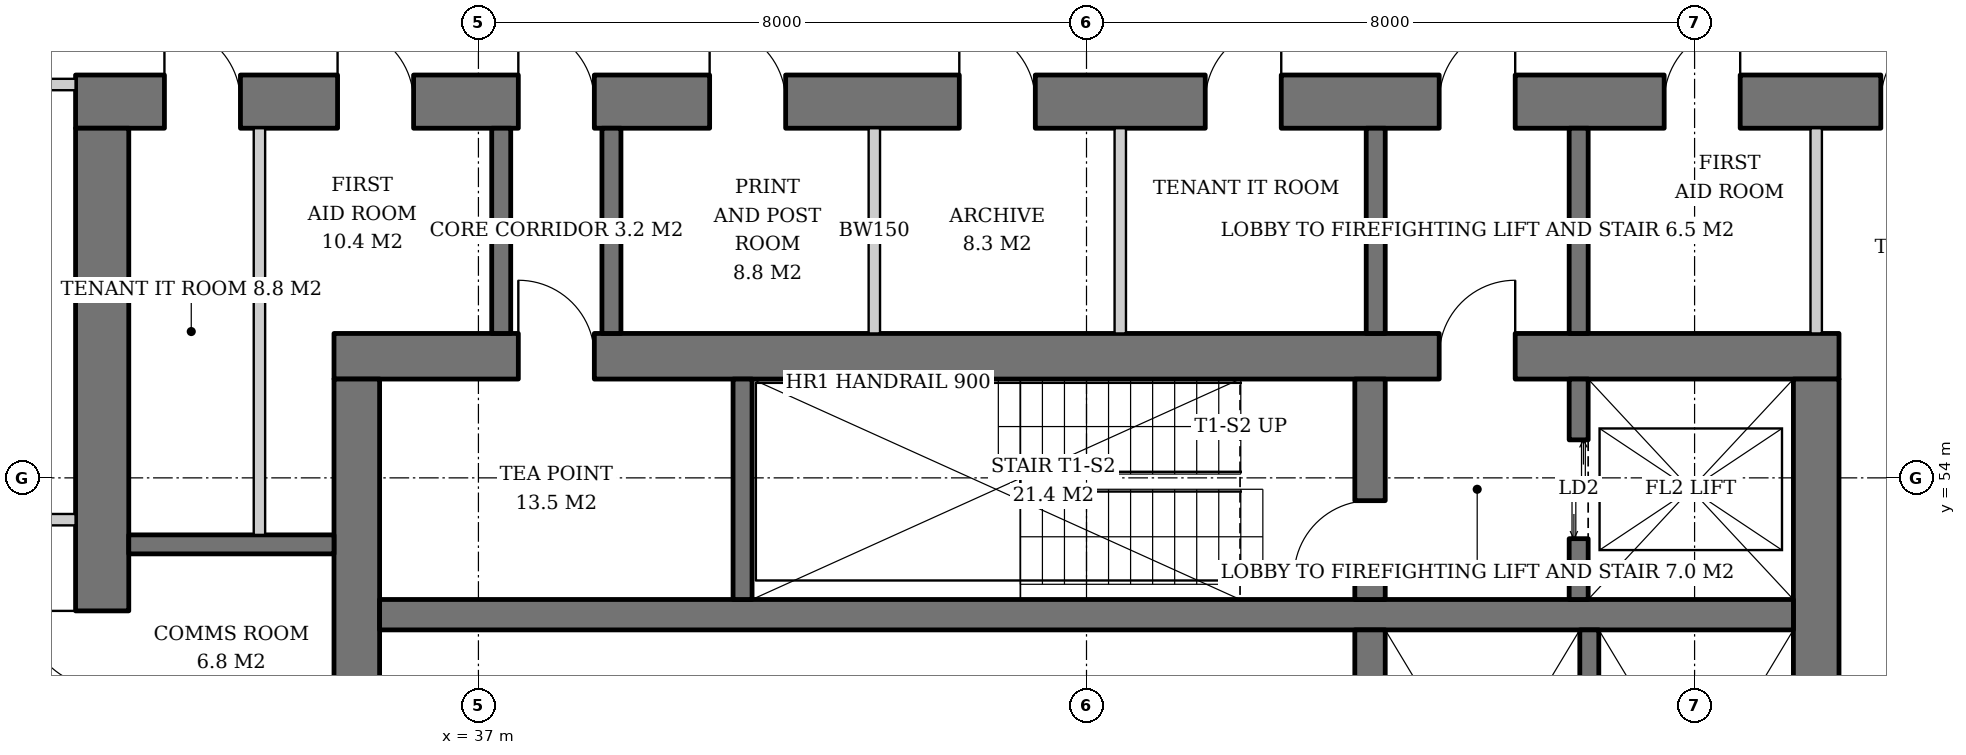
"""IFC4 building model, lengths in metres.
Left out: names, types, materials, properties, quantities, classifications, styles, units other than length and angle.
Written with IfcOpenShell. Run it as: python <this file> out.ifc"""

import sys

from ifc_helpers import new_model, si_unit, direction, frame, frame_2d, origin, place, context, subcontext, project, spatial, rectangle, extrude, element, fill, save


model = new_model("IFC4")
c1 = context("Model", 3, precision=1e-05, world=origin(), true_north=direction((0.0, 1.0)))
c2 = subcontext(c1, "Body", "Model", "MODEL_VIEW")
j1 = project(units=[si_unit("LENGTHUNIT", "METRE"), si_unit("PLANEANGLEUNIT", "RADIAN")], contexts=[c1])
p1 = place(None, origin())
s1 = spatial("IfcSite", under=j1, at=p1, CompositionType="ELEMENT")
p2 = place(p1, origin())
s2 = spatial("IfcBuilding", under=s1, at=p2, CompositionType="ELEMENT")
p3 = place(p2, frame((0.0, 0.0, 131.2)))
s3 = spatial("IfcBuildingStorey", under=s2, at=p3, CompositionType="ELEMENT", Elevation=131.2)
p4 = place(p3, frame((35.1, 55.6, 0.0), z_axis=(0.0, 0.0, 1.0), x_axis=(1.0, 0.0, 0.0)))
e1 = element("IfcWall", 1, at=p4, inside=s3, PredefinedType="SHEAR", context=c2, shape_type="SweptSolid", body=[
    extrude(rectangle(XDim=19.8, YDim=0.6, at=frame_2d((9.9, 0.0))), origin(), (0.0, 0.0, 1.0), 3.8),
])
p5 = place(p4, frame((14.54, 0.0, 0.0)))
e2 = element("IfcOpeningElement", 2, at=p5, cuts=e1, PredefinedType="OPENING", context=c2, shape_type="SweptSolid", body=[
    extrude(rectangle(XDim=1.0, YDim=2.1, at=frame_2d((0.5, 1.05))), frame((0.0, 0.31, 0.0), z_axis=(0.0, -1.0, 0.0), x_axis=(1.0, 0.0, 0.0)), (0.0, 0.0, 1.0), 0.62),
])
p6 = place(p4, frame((2.425, 0.0, 0.0)))
e3 = element("IfcOpeningElement", 3, at=p6, cuts=e1, PredefinedType="OPENING", context=c2, shape_type="SweptSolid", body=[
    extrude(rectangle(XDim=1.0, YDim=2.1, at=frame_2d((0.5, 1.05))), frame((0.0, 0.31, 0.0), z_axis=(0.0, -1.0, 0.0), x_axis=(1.0, 0.0, 0.0)), (0.0, 0.0, 1.0), 0.62),
])
p7 = place(p3, frame((35.4, 36.7, 0.0), z_axis=(0.0, 0.0, 1.0), x_axis=(0.0, 1.0, 0.0)))
e4 = element("IfcWall", 4, at=p7, inside=s3, PredefinedType="SHEAR", context=c2, shape_type="SweptSolid", body=[
    extrude(rectangle(XDim=18.6, YDim=0.6, at=frame_2d((9.3, 0.0))), origin(), (0.0, 0.0, 1.0), 3.8),
])
p8 = place(p7, frame((8.4, 0.0, 0.0)))
e5 = element("IfcOpeningElement", 5, at=p8, cuts=e4, PredefinedType="OPENING", context=c2, shape_type="SweptSolid", body=[
    extrude(rectangle(XDim=1.8, YDim=2.4, at=frame_2d((0.9, 1.2))), frame((0.0, 0.31, 0.0), z_axis=(0.0, -1.0, 0.0), x_axis=(1.0, 0.0, 0.0)), (0.0, 0.0, 1.0), 0.62),
])
p9 = place(p3, frame((54.6, 36.7, 0.0), z_axis=(0.0, 0.0, 1.0), x_axis=(0.0, 1.0, 0.0)))
e6 = element("IfcWall", 6, at=p9, inside=s3, PredefinedType="SHEAR", context=c2, shape_type="SweptSolid", body=[
    extrude(rectangle(XDim=18.6, YDim=0.6, at=frame_2d((9.3, 0.0))), origin(), (0.0, 0.0, 1.0), 3.8),
])
p10 = place(p9, frame((8.4, 0.0, 0.0)))
e7 = element("IfcOpeningElement", 7, at=p10, cuts=e6, PredefinedType="OPENING", context=c2, shape_type="SweptSolid", body=[
    extrude(rectangle(XDim=1.8, YDim=2.4, at=frame_2d((0.9, 1.2))), frame((0.0, 0.31, 0.0), z_axis=(0.0, -1.0, 0.0), x_axis=(1.0, 0.0, 0.0)), (0.0, 0.0, 1.0), 0.62),
])
p11 = place(p3, frame((31.7, 58.95, 0.0), z_axis=(0.0, 0.0, 1.0), x_axis=(1.0, 0.0, 0.0)))
e8 = element("IfcWall", 8, at=p11, inside=s3, PredefinedType="SHEAR", context=c2, shape_type="SweptSolid", body=[
    extrude(rectangle(XDim=26.6, YDim=0.7, at=frame_2d((13.3, 0.0))), origin(), (0.0, 0.0, 1.0), 3.8),
])
p12 = place(p11, frame((17.94, 0.0, 0.0)))
e9 = element("IfcOpeningElement", 9, at=p12, cuts=e8, PredefinedType="OPENING", context=c2, shape_type="SweptSolid", body=[
    extrude(rectangle(XDim=1.0, YDim=2.1, at=frame_2d((0.5, 1.05))), frame((0.0, 0.36, 0.0), z_axis=(0.0, -1.0, 0.0), x_axis=(1.0, 0.0, 0.0)), (0.0, 0.0, 1.0), 0.72),
])
p13 = place(p11, frame((5.825, 0.0, 0.0)))
e10 = element("IfcOpeningElement", 10, at=p13, cuts=e8, PredefinedType="OPENING", context=c2, shape_type="SweptSolid", body=[
    extrude(rectangle(XDim=1.0, YDim=2.1, at=frame_2d((0.5, 1.05))), frame((0.0, 0.36, 0.0), z_axis=(0.0, -1.0, 0.0), x_axis=(1.0, 0.0, 0.0)), (0.0, 0.0, 1.0), 0.72),
])
p14 = place(p11, frame((1.169, 0.0, 0.0)))
e11 = element("IfcOpeningElement", 11, at=p14, cuts=e8, PredefinedType="OPENING", context=c2, shape_type="SweptSolid", body=[
    extrude(rectangle(XDim=1.0, YDim=2.1, at=frame_2d((0.5, 1.05))), frame((0.0, 0.36, 0.0), z_axis=(0.0, -1.0, 0.0), x_axis=(1.0, 0.0, 0.0)), (0.0, 0.0, 1.0), 0.72),
])
p15 = place(p11, frame((3.447, 0.0, 0.0)))
e12 = element("IfcOpeningElement", 12, at=p15, cuts=e8, PredefinedType="OPENING", context=c2, shape_type="SweptSolid", body=[
    extrude(rectangle(XDim=1.0, YDim=2.1, at=frame_2d((0.5, 1.05))), frame((0.0, 0.36, 0.0), z_axis=(0.0, -1.0, 0.0), x_axis=(1.0, 0.0, 0.0)), (0.0, 0.0, 1.0), 0.72),
])
p16 = place(p11, frame((8.342, 0.0, 0.0)))
e13 = element("IfcOpeningElement", 13, at=p16, cuts=e8, PredefinedType="OPENING", context=c2, shape_type="SweptSolid", body=[
    extrude(rectangle(XDim=1.0, YDim=2.1, at=frame_2d((0.5, 1.05))), frame((0.0, 0.36, 0.0), z_axis=(0.0, -1.0, 0.0), x_axis=(1.0, 0.0, 0.0)), (0.0, 0.0, 1.0), 0.72),
])
p17 = place(p11, frame((11.626, 0.0, 0.0)))
e14 = element("IfcOpeningElement", 14, at=p17, cuts=e8, PredefinedType="OPENING", context=c2, shape_type="SweptSolid", body=[
    extrude(rectangle(XDim=1.0, YDim=2.1, at=frame_2d((0.5, 1.05))), frame((0.0, 0.36, 0.0), z_axis=(0.0, -1.0, 0.0), x_axis=(1.0, 0.0, 0.0)), (0.0, 0.0, 1.0), 0.72),
])
p18 = place(p11, frame((14.862, 0.0, 0.0)))
e15 = element("IfcOpeningElement", 15, at=p18, cuts=e8, PredefinedType="OPENING", context=c2, shape_type="SweptSolid", body=[
    extrude(rectangle(XDim=1.0, YDim=2.1, at=frame_2d((0.5, 1.05))), frame((0.0, 0.36, 0.0), z_axis=(0.0, -1.0, 0.0), x_axis=(1.0, 0.0, 0.0)), (0.0, 0.0, 1.0), 0.72),
])
p19 = place(p11, frame((20.9, 0.0, 0.0)))
e16 = element("IfcOpeningElement", 16, at=p19, cuts=e8, PredefinedType="OPENING", context=c2, shape_type="SweptSolid", body=[
    extrude(rectangle(XDim=1.0, YDim=2.1, at=frame_2d((0.5, 1.05))), frame((0.0, 0.36, 0.0), z_axis=(0.0, -1.0, 0.0), x_axis=(1.0, 0.0, 0.0)), (0.0, 0.0, 1.0), 0.72),
])
p20 = place(p11, frame((23.75, 0.0, 0.0)))
e17 = element("IfcOpeningElement", 17, at=p20, cuts=e8, PredefinedType="OPENING", context=c2, shape_type="SweptSolid", body=[
    extrude(rectangle(XDim=1.0, YDim=2.1, at=frame_2d((0.5, 1.05))), frame((0.0, 0.36, 0.0), z_axis=(0.0, -1.0, 0.0), x_axis=(1.0, 0.0, 0.0)), (0.0, 0.0, 1.0), 0.72),
])
p21 = place(p3, frame((32.05, 33.4, 0.0), z_axis=(0.0, 0.0, 1.0), x_axis=(0.0, 1.0, 0.0)))
e18 = element("IfcWall", 18, at=p21, inside=s3, PredefinedType="SHEAR", context=c2, shape_type="SweptSolid", body=[
    extrude(rectangle(XDim=25.2, YDim=0.7, at=frame_2d((12.6, 0.0))), origin(), (0.0, 0.0, 1.0), 3.8),
])
p22 = place(p21, frame((11.7, 0.0, 0.0)))
e19 = element("IfcOpeningElement", 19, at=p22, cuts=e18, PredefinedType="OPENING", context=c2, shape_type="SweptSolid", body=[
    extrude(rectangle(XDim=1.8, YDim=2.4, at=frame_2d((0.9, 1.2))), frame((0.0, 0.36, 0.0), z_axis=(0.0, -1.0, 0.0), x_axis=(1.0, 0.0, 0.0)), (0.0, 0.0, 1.0), 0.72),
])
p23 = place(p21, frame((3.6, 0.0, 0.0)))
e20 = element("IfcOpeningElement", 20, at=p23, cuts=e18, PredefinedType="OPENING", context=c2, shape_type="SweptSolid", body=[
    extrude(rectangle(XDim=1.0, YDim=2.1, at=frame_2d((0.5, 1.05))), frame((0.0, 0.36, 0.0), z_axis=(0.0, -1.0, 0.0), x_axis=(1.0, 0.0, 0.0)), (0.0, 0.0, 1.0), 0.72),
])
p24 = place(p21, frame((6.35, 0.0, 0.0)))
e21 = element("IfcOpeningElement", 21, at=p24, cuts=e18, PredefinedType="OPENING", context=c2, shape_type="SweptSolid", body=[
    extrude(rectangle(XDim=1.0, YDim=2.1, at=frame_2d((0.5, 1.05))), frame((0.0, 0.36, 0.0), z_axis=(0.0, -1.0, 0.0), x_axis=(1.0, 0.0, 0.0)), (0.0, 0.0, 1.0), 0.72),
])
p25 = place(p21, frame((9.1, 0.0, 0.0)))
e22 = element("IfcOpeningElement", 22, at=p25, cuts=e18, PredefinedType="OPENING", context=c2, shape_type="SweptSolid", body=[
    extrude(rectangle(XDim=1.0, YDim=2.1, at=frame_2d((0.5, 1.05))), frame((0.0, 0.36, 0.0), z_axis=(0.0, -1.0, 0.0), x_axis=(1.0, 0.0, 0.0)), (0.0, 0.0, 1.0), 0.72),
])
p26 = place(p21, frame((15.1, 0.0, 0.0)))
e23 = element("IfcOpeningElement", 23, at=p26, cuts=e18, PredefinedType="OPENING", context=c2, shape_type="SweptSolid", body=[
    extrude(rectangle(XDim=1.0, YDim=2.1, at=frame_2d((0.5, 1.05))), frame((0.0, 0.36, 0.0), z_axis=(0.0, -1.0, 0.0), x_axis=(1.0, 0.0, 0.0)), (0.0, 0.0, 1.0), 0.72),
])
p27 = place(p21, frame((17.85, 0.0, 0.0)))
e24 = element("IfcOpeningElement", 24, at=p27, cuts=e18, PredefinedType="OPENING", context=c2, shape_type="SweptSolid", body=[
    extrude(rectangle(XDim=1.0, YDim=2.1, at=frame_2d((0.5, 1.05))), frame((0.0, 0.36, 0.0), z_axis=(0.0, -1.0, 0.0), x_axis=(1.0, 0.0, 0.0)), (0.0, 0.0, 1.0), 0.72),
])
p28 = place(p3, frame((35.7, 52.2, 0.0), z_axis=(0.0, 0.0, 1.0), x_axis=(1.0, 0.0, 0.0)))
e25 = element("IfcWall", 25, at=p28, inside=s3, PredefinedType="SHEAR", context=c2, shape_type="SweptSolid", body=[
    extrude(rectangle(XDim=18.6, YDim=0.4, at=frame_2d((9.3, 0.0))), origin(), (0.0, 0.0, 1.0), 3.8),
])
p29 = place(p3, frame((48.73, 40.0, 0.0), z_axis=(0.0, 0.0, 1.0), x_axis=(0.0, 1.0, 0.0)))
e26 = element("IfcWall", 26, at=p29, inside=s3, PredefinedType="SHEAR", context=c2, shape_type="SweptSolid", body=[
    extrude(rectangle(XDim=12.0, YDim=0.4, at=frame_2d((6.0, 0.0))), origin(), (0.0, 0.0, 1.0), 3.8),
])
p30 = place(p3, frame((48.73, 52.4, 0.0), z_axis=(0.0, 0.0, 1.0), x_axis=(0.0, 1.0, 0.0)))
e27 = element("IfcWall", 27, at=p30, inside=s3, PredefinedType="SHEAR", context=c2, shape_type="SweptSolid", body=[
    extrude(rectangle(XDim=2.9, YDim=0.4, at=frame_2d((1.45, 0.0))), origin(), (0.0, 0.0, 1.0), 3.8),
])
p31 = place(p30, frame((0.3, 0.0, 0.0)))
e28 = element("IfcOpeningElement", 28, at=p31, cuts=e27, PredefinedType="OPENING", context=c2, shape_type="SweptSolid", body=[
    extrude(rectangle(XDim=1.0, YDim=2.1, at=frame_2d((0.5, 1.05))), frame((0.0, 0.21, 0.0), z_axis=(0.0, -1.0, 0.0), x_axis=(1.0, 0.0, 0.0)), (0.0, 0.0, 1.0), 0.42),
])
p32 = place(p3, frame((40.475, 52.4, 0.0), z_axis=(0.0, 0.0, 1.0), x_axis=(0.0, 1.0, 0.0)))
e29 = element("IfcWall", 29, at=p32, inside=s3, PredefinedType="SHEAR", context=c2, shape_type="SweptSolid", body=[
    extrude(rectangle(XDim=2.9, YDim=0.25, at=frame_2d((1.45, 0.0))), origin(), (0.0, 0.0, 1.0), 3.8),
])
p33 = place(p3, frame((51.475, 52.4, 0.0), z_axis=(0.0, 0.0, 1.0), x_axis=(0.0, 1.0, 0.0)))
e30 = element("IfcWall", 30, at=p33, inside=s3, PredefinedType="SHEAR", context=c2, shape_type="SweptSolid", body=[
    extrude(rectangle(XDim=2.9, YDim=0.25, at=frame_2d((1.45, 0.0))), origin(), (0.0, 0.0, 1.0), 3.8),
])
p34 = place(p33, frame((0.8, 0.0, 0.0)))
e31 = element("IfcOpeningElement", 31, at=p34, cuts=e30, PredefinedType="OPENING", context=c2, shape_type="SweptSolid", body=[
    extrude(rectangle(XDim=1.3, YDim=2.2, at=frame_2d((0.65, 1.1))), frame((0.0, 0.135, 0.0), z_axis=(0.0, -1.0, 0.0), x_axis=(1.0, 0.0, 0.0)), (0.0, 0.0, 1.0), 0.27),
])
p35 = place(p3, frame((51.615, 47.75, 0.0), z_axis=(0.0, 0.0, 1.0), x_axis=(0.0, 1.0, 0.0)))
e32 = element("IfcWall", 32, at=p35, inside=s3, PredefinedType="SHEAR", context=c2, shape_type="SweptSolid", body=[
    extrude(rectangle(XDim=4.25, YDim=0.25, at=frame_2d((2.125, 0.0))), origin(), (0.0, 0.0, 1.0), 3.8),
])
p36 = place(p3, frame((32.4, 53.125, 0.0), z_axis=(0.0, 0.0, 1.0), x_axis=(1.0, 0.0, 0.0)))
e33 = element("IfcWall", 33, at=p36, inside=s3, PredefinedType="SHEAR", context=c2, shape_type="SweptSolid", body=[
    extrude(rectangle(XDim=2.7, YDim=0.25, at=frame_2d((1.35, 0.0))), origin(), (0.0, 0.0, 1.0), 3.8),
])
for number, where, z_axis, x_axis in (
    (34, (48.805, 55.9, 0.0), (0.0, 0.0, 1.0), (0.0, 1.0, 0.0)),
    (35, (51.475, 55.9, 0.0), (0.0, 0.0, 1.0), (0.0, 1.0, 0.0)),
    (36, (37.3, 55.9, 0.0), (0.0, 0.0, 1.0), (0.0, 1.0, 0.0)),
    (37, (38.75, 55.9, 0.0), (0.0, 0.0, 1.0), (0.0, 1.0, 0.0)),
):
    element("IfcWall", number, at=place(p3, frame(where, z_axis=z_axis, x_axis=x_axis)), inside=s3, PredefinedType="SOLIDWALL", context=c2, shape_type="SweptSolid", body=[
        extrude(rectangle(XDim=2.7, YDim=0.25, at=frame_2d((1.35, 0.0))), origin(), (0.0, 0.0, 1.0), 3.62),
    ])
p37 = place(p3, frame((34.119, 53.25, 0.0), z_axis=(0.0, 0.0, 1.0), x_axis=(0.0, 1.0, 0.0)))
e38 = element("IfcWall", 38, at=p37, inside=s3, PredefinedType="SOLIDWALL", context=c2, shape_type="SweptSolid", body=[
    extrude(rectangle(XDim=5.35, YDim=0.15, at=frame_2d((2.675, 0.0))), origin(), (0.0, 0.0, 1.0), 3.62),
])
for number, where, z_axis, x_axis in (
    (39, (42.209, 55.9, 0.0), (0.0, 0.0, 1.0), (0.0, 1.0, 0.0)),
    (40, (45.444, 55.9, 0.0), (0.0, 0.0, 1.0), (0.0, 1.0, 0.0)),
    (41, (54.6, 55.9, 0.0), (0.0, 0.0, 1.0), (0.0, 1.0, 0.0)),
):
    element("IfcWall", number, at=place(p3, frame(where, z_axis=z_axis, x_axis=x_axis)), inside=s3, PredefinedType="SOLIDWALL", context=c2, shape_type="SweptSolid", body=[
        extrude(rectangle(XDim=2.7, YDim=0.15, at=frame_2d((1.35, 0.0))), origin(), (0.0, 0.0, 1.0), 3.62),
    ])
p38 = place(p3, frame((31.7, 59.175, 0.0), z_axis=(0.0, 0.0, 1.0), x_axis=(-1.0, 0.0, 0.0)))
e42 = element("IfcWall", 42, at=p38, inside=s3, PredefinedType="PARTITIONING", context=c2, shape_type="SweptSolid", body=[
    extrude(rectangle(XDim=2.925, YDim=0.15, at=frame_2d((1.462, 0.0))), origin(), (0.0, 0.0, 1.0), 2.72),
])
p39 = place(p3, frame((31.7, 53.45, 0.0), z_axis=(0.0, 0.0, 1.0), x_axis=(-1.0, 0.0, 0.0)))
e43 = element("IfcWall", 43, at=p39, inside=s3, PredefinedType="PARTITIONING", context=c2, shape_type="SweptSolid", body=[
    extrude(rectangle(XDim=2.925, YDim=0.15, at=frame_2d((1.462, 0.0))), origin(), (0.0, 0.0, 1.0), 3.62),
])
p40 = place(p34, origin())
e44 = element("IfcDoor", 44, at=p40, inside=s3, OperationType="DOUBLE_DOOR_SLIDING", PredefinedType="DOOR", context=c2, shape_type="SweptSolid", body=[
    extrude(rectangle(XDim=1.3, YDim=2.2, at=frame_2d((0.65, 1.1))), frame((0.0, 0.025, 0.0), z_axis=(0.0, -1.0, 0.0), x_axis=(1.0, 0.0, 0.0)), (0.0, 0.0, 1.0), 0.05),
])
fill(e31, e44)
p41 = place(p31, origin())
e45 = element("IfcDoor", 45, at=p41, inside=s3, OperationType="SINGLE_SWING_LEFT", PredefinedType="DOOR", context=c2, shape_type="SweptSolid", body=[
    extrude(rectangle(XDim=1.0, YDim=2.1, at=frame_2d((0.5, 1.05))), frame((0.0, 0.025, 0.0), z_axis=(0.0, -1.0, 0.0), x_axis=(1.0, 0.0, 0.0)), (0.0, 0.0, 1.0), 0.05),
])
fill(e28, e45)
p42 = place(p5, origin())
e46 = element("IfcDoor", 46, at=p42, inside=s3, OperationType="SINGLE_SWING_RIGHT", PredefinedType="DOOR", context=c2, shape_type="SweptSolid", body=[
    extrude(rectangle(XDim=1.0, YDim=2.1, at=frame_2d((0.5, 1.05))), frame((0.0, 0.025, 0.0), z_axis=(0.0, -1.0, 0.0), x_axis=(1.0, 0.0, 0.0)), (0.0, 0.0, 1.0), 0.05),
])
fill(e2, e46)
p43 = place(p12, origin())
e47 = element("IfcDoor", 47, at=p43, inside=s3, OperationType="SINGLE_SWING_RIGHT", PredefinedType="DOOR", context=c2, shape_type="SweptSolid", body=[
    extrude(rectangle(XDim=1.0, YDim=2.1, at=frame_2d((0.5, 1.05))), frame((0.0, 0.025, 0.0), z_axis=(0.0, -1.0, 0.0), x_axis=(1.0, 0.0, 0.0)), (0.0, 0.0, 1.0), 0.05),
])
fill(e9, e47)
p44 = place(p13, origin())
e48 = element("IfcDoor", 48, at=p44, inside=s3, OperationType="SINGLE_SWING_LEFT", PredefinedType="DOOR", context=c2, shape_type="SweptSolid", body=[
    extrude(rectangle(XDim=1.0, YDim=2.1, at=frame_2d((0.5, 1.05))), frame((0.0, 0.025, 0.0), z_axis=(0.0, -1.0, 0.0), x_axis=(1.0, 0.0, 0.0)), (0.0, 0.0, 1.0), 0.05),
])
fill(e10, e48)
p45 = place(p6, origin())
e49 = element("IfcDoor", 49, at=p45, inside=s3, OperationType="SINGLE_SWING_LEFT", PredefinedType="DOOR", context=c2, shape_type="SweptSolid", body=[
    extrude(rectangle(XDim=1.0, YDim=2.1, at=frame_2d((0.5, 1.05))), frame((0.0, -0.24, 0.0), z_axis=(0.0, -1.0, 0.0), x_axis=(1.0, 0.0, 0.0)), (0.0, 0.0, 1.0), 0.05),
])
fill(e3, e49)
p46 = place(p27, origin())
e50 = element("IfcDoor", 50, at=p46, inside=s3, OperationType="SINGLE_SWING_RIGHT", PredefinedType="DOOR", context=c2, shape_type="SweptSolid", body=[
    extrude(rectangle(XDim=1.0, YDim=2.1, at=frame_2d((0.5, 1.05))), frame((0.0, -0.29, 0.0), z_axis=(0.0, -1.0, 0.0), x_axis=(1.0, 0.0, 0.0)), (0.0, 0.0, 1.0), 0.05),
])
fill(e24, e50)
p47 = place(p14, origin())
e51 = element("IfcDoor", 51, at=p47, inside=s3, OperationType="SINGLE_SWING_LEFT", PredefinedType="DOOR", context=c2, shape_type="SweptSolid", body=[
    extrude(rectangle(XDim=1.0, YDim=2.1, at=frame_2d((0.5, 1.05))), frame((0.0, -0.29, 0.0), z_axis=(0.0, -1.0, 0.0), x_axis=(1.0, 0.0, 0.0)), (0.0, 0.0, 1.0), 0.05),
])
fill(e11, e51)
p48 = place(p15, origin())
e52 = element("IfcDoor", 52, at=p48, inside=s3, OperationType="SINGLE_SWING_LEFT", PredefinedType="DOOR", context=c2, shape_type="SweptSolid", body=[
    extrude(rectangle(XDim=1.0, YDim=2.1, at=frame_2d((0.5, 1.05))), frame((0.0, -0.29, 0.0), z_axis=(0.0, -1.0, 0.0), x_axis=(1.0, 0.0, 0.0)), (0.0, 0.0, 1.0), 0.05),
])
fill(e12, e52)
p49 = place(p16, origin())
e53 = element("IfcDoor", 53, at=p49, inside=s3, OperationType="SINGLE_SWING_LEFT", PredefinedType="DOOR", context=c2, shape_type="SweptSolid", body=[
    extrude(rectangle(XDim=1.0, YDim=2.1, at=frame_2d((0.5, 1.05))), frame((0.0, -0.29, 0.0), z_axis=(0.0, -1.0, 0.0), x_axis=(1.0, 0.0, 0.0)), (0.0, 0.0, 1.0), 0.05),
])
fill(e13, e53)
p50 = place(p17, origin())
e54 = element("IfcDoor", 54, at=p50, inside=s3, OperationType="SINGLE_SWING_LEFT", PredefinedType="DOOR", context=c2, shape_type="SweptSolid", body=[
    extrude(rectangle(XDim=1.0, YDim=2.1, at=frame_2d((0.5, 1.05))), frame((0.0, -0.29, 0.0), z_axis=(0.0, -1.0, 0.0), x_axis=(1.0, 0.0, 0.0)), (0.0, 0.0, 1.0), 0.05),
])
fill(e14, e54)
p51 = place(p18, origin())
e55 = element("IfcDoor", 55, at=p51, inside=s3, OperationType="SINGLE_SWING_RIGHT", PredefinedType="DOOR", context=c2, shape_type="SweptSolid", body=[
    extrude(rectangle(XDim=1.0, YDim=2.1, at=frame_2d((0.5, 1.05))), frame((0.0, -0.29, 0.0), z_axis=(0.0, -1.0, 0.0), x_axis=(1.0, 0.0, 0.0)), (0.0, 0.0, 1.0), 0.05),
])
fill(e15, e55)
p52 = place(p19, origin())
e56 = element("IfcDoor", 56, at=p52, inside=s3, OperationType="SINGLE_SWING_RIGHT", PredefinedType="DOOR", context=c2, shape_type="SweptSolid", body=[
    extrude(rectangle(XDim=1.0, YDim=2.1, at=frame_2d((0.5, 1.05))), frame((0.0, -0.29, 0.0), z_axis=(0.0, -1.0, 0.0), x_axis=(1.0, 0.0, 0.0)), (0.0, 0.0, 1.0), 0.05),
])
fill(e16, e56)
p53 = place(p20, origin())
e57 = element("IfcDoor", 57, at=p53, inside=s3, OperationType="SINGLE_SWING_RIGHT", PredefinedType="DOOR", context=c2, shape_type="SweptSolid", body=[
    extrude(rectangle(XDim=1.0, YDim=2.1, at=frame_2d((0.5, 1.05))), frame((0.0, -0.29, 0.0), z_axis=(0.0, -1.0, 0.0), x_axis=(1.0, 0.0, 0.0)), (0.0, 0.0, 1.0), 0.05),
])
fill(e17, e57)
save(model, sys.argv[1])
